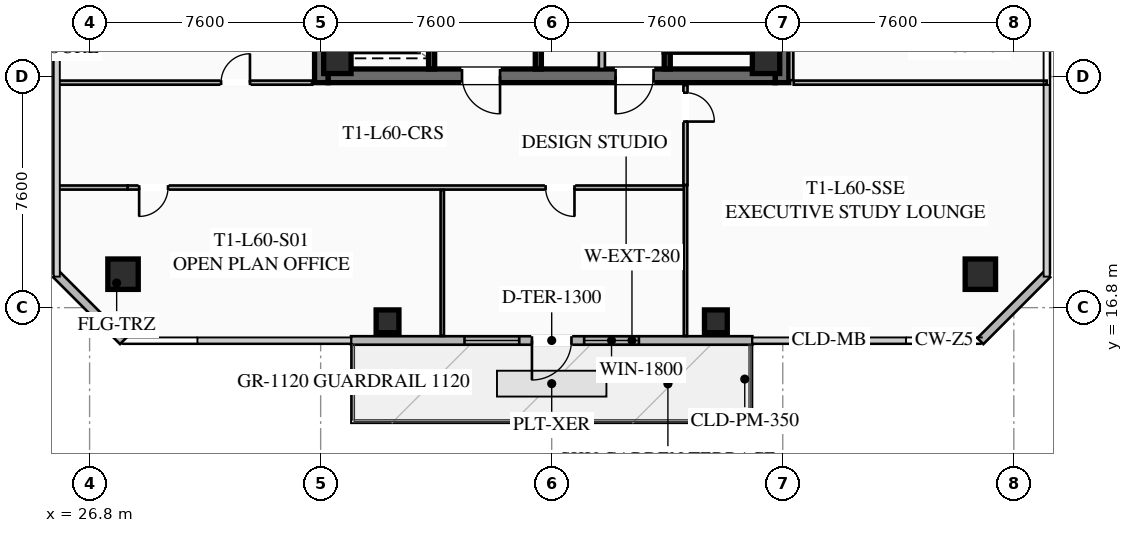
"""IFC4 building model, lengths in metres.
Left out: names, types, materials, properties, quantities, classifications, styles, units other than length and angle.
Written with IfcOpenShell. Run it as: python <this file> out.ifc"""

import sys

from ifc_helpers import new_model, si_unit, direction, frame, frame_2d, origin, origin_2d, place, context, subcontext, project, spatial, rectangle, hollow_rectangle, extrude, element, fill, save


model = new_model("IFC4")
c1 = context("Model", 3, precision=1e-05, world=origin(), true_north=direction((0.0, 1.0)))
c2 = subcontext(c1, "Body", "Model", "MODEL_VIEW")
j1 = project(units=[si_unit("LENGTHUNIT", "METRE"), si_unit("PLANEANGLEUNIT", "RADIAN")], contexts=[c1])
p1 = place(None, origin())
s1 = spatial("IfcSite", under=j1, at=p1, CompositionType="ELEMENT")
p2 = place(p1, origin())
s2 = spatial("IfcBuilding", under=s1, at=p2, CompositionType="ELEMENT")
p3 = place(p2, frame((0.0, 0.0, 221.95)))
s3 = spatial("IfcBuildingStorey", under=s2, at=p3, CompositionType="ELEMENT", Elevation=221.95)
for number, where, z_axis, x_axis in (
    (1, (34.425, 24.2, 0.0), (0.0, 0.0, 1.0), (0.0, 1.0, 0.0)),
    (2, (49.575, 39.8, 0.0), (0.0, 0.0, 1.0), (0.0, -1.0, 0.0)),
):
    element("IfcWall", number, at=place(p3, frame(where, z_axis=z_axis, x_axis=x_axis)), inside=s3, PredefinedType="SHEAR", context=c2, shape_type="SweptSolid", body=[
        extrude(rectangle(XDim=15.6, YDim=0.45, at=frame_2d((7.8, 0.0))), origin(), (0.0, 0.0, 1.0), 3.55),
    ])
p4 = place(p3, frame((49.35, 24.425, 0.0), z_axis=(0.0, 0.0, 1.0), x_axis=(-1.0, 0.0, 0.0)))
e3 = element("IfcWall", 3, at=p4, inside=s3, PredefinedType="SHEAR", context=c2, shape_type="SweptSolid", body=[
    extrude(rectangle(XDim=14.7, YDim=0.45, at=frame_2d((7.35, 0.0))), origin(), (0.0, 0.0, 1.0), 3.55),
])
p5 = place(p4, frame((9.05, 0.0, 0.0)))
e4 = element("IfcOpeningElement", 4, at=p5, cuts=e3, PredefinedType="OPENING", context=c2, shape_type="SweptSolid", body=[
    extrude(rectangle(XDim=1.25, YDim=2.25, at=frame_2d((0.625, 1.125))), frame((0.0, 0.235, 0.0), z_axis=(0.0, -1.0, 0.0), x_axis=(1.0, 0.0, 0.0)), (0.0, 0.0, 1.0), 0.47),
])
p6 = place(p4, frame((4.0, 0.0, 0.0)))
e5 = element("IfcOpeningElement", 5, at=p6, cuts=e3, PredefinedType="OPENING", context=c2, shape_type="SweptSolid", body=[
    extrude(rectangle(XDim=1.25, YDim=2.25, at=frame_2d((0.625, 1.125))), frame((0.0, 0.235, 0.0), z_axis=(0.0, -1.0, 0.0), x_axis=(1.0, 0.0, 0.0)), (0.0, 0.0, 1.0), 0.47),
])
for number, where, z_axis, x_axis in (
    (6, (34.95, 24.95, 0.0), (0.0, 0.0, 1.0), (1.0, 0.0, 0.0)),
    (7, (49.05, 24.95, 0.0), (0.0, 0.0, 1.0), (1.0, 0.0, 0.0)),
):
    element("IfcColumn", number, at=place(p3, frame(where, z_axis=z_axis, x_axis=x_axis)), inside=s3, PredefinedType="COLUMN", context=c2, shape_type="SweptSolid", body=[
        extrude(hollow_rectangle(XDim=0.9, YDim=0.9, WallThickness=0.04, at=origin_2d()), origin(), (0.0, 0.0, 1.0), 3.37),
    ])
for number, where, z_axis, x_axis in (
    (8, (27.9, 17.9, 0.0), (0.0, 0.0, 1.0), (1.0, 0.0, 0.0)),
    (9, (56.1, 17.9, 0.0), (0.0, 0.0, 1.0), (1.0, 0.0, 0.0)),
):
    element("IfcColumn", number, at=place(p3, frame(where, z_axis=z_axis, x_axis=x_axis)), inside=s3, PredefinedType="COLUMN", context=c2, shape_type="SweptSolid", body=[
        extrude(hollow_rectangle(XDim=1.0, YDim=1.0, WallThickness=0.04, at=origin_2d()), origin(), (0.0, 0.0, 1.0), 3.37),
    ])
for number, where, z_axis, x_axis in (
    (10, (36.6, 16.35, 0.0), (0.0, 0.0, 1.0), (1.0, 0.0, 0.0)),
    (11, (47.4, 16.35, 0.0), (0.0, 0.0, 1.0), (1.0, 0.0, 0.0)),
):
    element("IfcColumn", number, at=place(p3, frame(where, z_axis=z_axis, x_axis=x_axis)), inside=s3, PredefinedType="COLUMN", context=c2, shape_type="SweptSolid", body=[
        extrude(hollow_rectangle(XDim=0.75, YDim=0.75, WallThickness=0.032, at=origin_2d()), origin(), (0.0, 0.0, 1.0), 3.37),
    ])
p7 = place(p3, frame((48.6, 15.72, 0.0), z_axis=(0.0, 0.0, 1.0), x_axis=(-1.0, 0.0, 0.0)))
e12 = element("IfcWall", 12, at=p7, inside=s3, PredefinedType="SOLIDWALL", context=c2, shape_type="SweptSolid", body=[
    extrude(rectangle(XDim=13.2, YDim=0.28, at=frame_2d((6.6, 0.0))), origin(), (0.0, 0.0, 1.0), 3.37),
])
p8 = place(p7, frame((5.95, 0.0, 0.0)))
e13 = element("IfcOpeningElement", 13, at=p8, cuts=e12, PredefinedType="OPENING", context=c2, shape_type="SweptSolid", body=[
    extrude(rectangle(XDim=1.3, YDim=2.15, at=frame_2d((0.65, 1.075))), frame((0.0, 0.15, 0.0), z_axis=(0.0, -1.0, 0.0), x_axis=(1.0, 0.0, 0.0)), (0.0, 0.0, 1.0), 0.3),
])
p9 = place(p7, frame((3.732, 0.0, 0.85)))
e14 = element("IfcOpeningElement", 14, at=p9, cuts=e12, PredefinedType="OPENING", context=c2, shape_type="SweptSolid", body=[
    extrude(rectangle(XDim=1.8, YDim=1.92, at=frame_2d((0.9, 0.96))), frame((0.0, 0.15, 0.0), z_axis=(0.0, -1.0, 0.0), x_axis=(1.0, 0.0, 0.0)), (0.0, 0.0, 1.0), 0.3),
])
p10 = place(p7, frame((7.668, 0.0, 0.85)))
e15 = element("IfcOpeningElement", 15, at=p10, cuts=e12, PredefinedType="OPENING", context=c2, shape_type="SweptSolid", body=[
    extrude(rectangle(XDim=1.8, YDim=1.92, at=frame_2d((0.9, 0.96))), frame((0.0, 0.15, 0.0), z_axis=(0.0, -1.0, 0.0), x_axis=(1.0, 0.0, 0.0)), (0.0, 0.0, 1.0), 0.3),
])
for number, where, z_axis, x_axis in (
    (16, (27.9, 15.7, 0.0), (0.0, 0.0, 1.0), (-0.707, 0.707, 0.0)),
    (17, (58.3, 17.9, 0.0), (0.0, 0.0, 1.0), (-0.707, -0.707, 0.0)),
):
    element("IfcWall", number, at=place(p3, frame(where, z_axis=z_axis, x_axis=x_axis)), inside=s3, PredefinedType="SOLIDWALL", context=c2, shape_type="SweptSolid", body=[
        extrude(rectangle(XDim=3.111, YDim=0.28, at=frame_2d((1.556, 0.0))), origin(), (0.0, 0.0, 1.0), 3.37),
    ])
p11 = place(p3, frame((45.8, 32.8, 0.0), z_axis=(0.0, 0.0, 1.0), x_axis=(0.0, -1.0, 0.0)))
e18 = element("IfcWall", 18, at=p11, inside=s3, PredefinedType="SHEAR", context=c2, shape_type="SweptSolid", body=[
    extrude(rectangle(XDim=8.15, YDim=0.2, at=frame_2d((4.075, 0.0))), origin(), (0.0, 0.0, 1.0), 3.37),
])
p12 = place(p11, frame((0.45, 0.0, 0.0)))
e19 = element("IfcOpeningElement", 19, at=p12, cuts=e18, PredefinedType="OPENING", context=c2, shape_type="SweptSolid", body=[
    extrude(rectangle(XDim=1.15, YDim=2.2, at=frame_2d((0.575, 1.1))), frame((0.0, 0.11, 0.0), z_axis=(0.0, -1.0, 0.0), x_axis=(1.0, 0.0, 0.0)), (0.0, 0.0, 1.0), 0.22),
])
p13 = place(p3, frame((41.56, 24.65, 0.0), z_axis=(0.0, 0.0, 1.0), x_axis=(0.0, 1.0, 0.0)))
e20 = element("IfcWall", 20, at=p13, inside=s3, PredefinedType="SHEAR", context=c2, shape_type="SweptSolid", body=[
    extrude(rectangle(XDim=14.7, YDim=0.2, at=frame_2d((7.35, 0.0))), origin(), (0.0, 0.0, 1.0), 3.37),
])
p14 = place(p3, frame((38.05, 24.65, 0.0), z_axis=(0.0, 0.0, 1.0), x_axis=(0.0, 1.0, 0.0)))
e21 = element("IfcWall", 21, at=p14, inside=s3, PredefinedType="SHEAR", context=c2, shape_type="SweptSolid", body=[
    extrude(rectangle(XDim=6.55, YDim=0.2, at=frame_2d((3.275, 0.0))), origin(), (0.0, 0.0, 1.0), 3.37),
])
p15 = place(p14, frame((4.975, 0.0, 0.0)))
e22 = element("IfcOpeningElement", 22, at=p15, cuts=e21, PredefinedType="OPENING", context=c2, shape_type="SweptSolid", body=[
    extrude(rectangle(XDim=1.3, YDim=2.25, at=frame_2d((0.65, 1.125))), frame((0.0, 0.11, 0.0), z_axis=(0.0, -1.0, 0.0), x_axis=(1.0, 0.0, 0.0)), (0.0, 0.0, 1.0), 0.22),
])
p16 = place(p14, frame((2.975, 0.0, 0.0)))
e23 = element("IfcOpeningElement", 23, at=p16, cuts=e21, PredefinedType="OPENING", context=c2, shape_type="SweptSolid", body=[
    extrude(rectangle(XDim=1.3, YDim=2.25, at=frame_2d((0.65, 1.125))), frame((0.0, 0.11, 0.0), z_axis=(0.0, -1.0, 0.0), x_axis=(1.0, 0.0, 0.0)), (0.0, 0.0, 1.0), 0.22),
])
p17 = place(p14, frame((0.775, 0.0, 0.0)))
e24 = element("IfcOpeningElement", 24, at=p17, cuts=e21, PredefinedType="OPENING", context=c2, shape_type="SweptSolid", body=[
    extrude(rectangle(XDim=1.3, YDim=2.25, at=frame_2d((0.65, 1.125))), frame((0.0, 0.11, 0.0), z_axis=(0.0, -1.0, 0.0), x_axis=(1.0, 0.0, 0.0)), (0.0, 0.0, 1.0), 0.22),
])
p18 = place(p3, frame((43.65, 24.65, 0.0), z_axis=(0.0, 0.0, 1.0), x_axis=(0.0, 1.0, 0.0)))
e25 = element("IfcWall", 25, at=p18, inside=s3, PredefinedType="SOLIDWALL", context=c2, shape_type="SweptSolid", body=[
    extrude(rectangle(XDim=7.0, YDim=0.2, at=frame_2d((3.5, 0.0))), origin(), (0.0, 0.0, 1.0), 2.723),
])
p19 = place(p18, frame((0.85, 0.0, 0.0)))
e26 = element("IfcOpeningElement", 26, at=p19, cuts=e25, PredefinedType="OPENING", context=c2, shape_type="SweptSolid", body=[
    extrude(rectangle(XDim=0.95, YDim=2.05, at=frame_2d((0.475, 1.025))), frame((0.0, 0.11, 0.0), z_axis=(0.0, -1.0, 0.0), x_axis=(1.0, 0.0, 0.0)), (0.0, 0.0, 1.0), 0.22),
])
p20 = place(p18, frame((4.8, 0.0, 0.0)))
e27 = element("IfcOpeningElement", 27, at=p20, cuts=e25, PredefinedType="OPENING", context=c2, shape_type="SweptSolid", body=[
    extrude(rectangle(XDim=1.05, YDim=2.2, at=frame_2d((0.525, 1.1))), frame((0.0, 0.11, 0.0), z_axis=(0.0, -1.0, 0.0), x_axis=(1.0, 0.0, 0.0)), (0.0, 0.0, 1.0), 0.22),
])
p21 = place(p3, frame((46.4, 20.75, 0.0), z_axis=(0.0, 0.0, 1.0), x_axis=(-1.0, 0.0, 0.0)))
e28 = element("IfcWall", 28, at=p21, inside=s3, PredefinedType="PARTITIONING", context=c2, shape_type="SweptSolid", body=[
    extrude(rectangle(XDim=18.35, YDim=0.135, at=frame_2d((9.175, 0.0))), origin(), (0.0, 0.0, 1.0), 2.723),
])
p22 = place(p21, frame((17.02, 0.0, 0.0)))
e29 = element("IfcOpeningElement", 29, at=p22, cuts=e28, PredefinedType="OPENING", context=c2, shape_type="SweptSolid", body=[
    extrude(rectangle(XDim=0.95, YDim=2.05, at=frame_2d((0.475, 1.025))), frame((0.0, 0.077, 0.0), z_axis=(0.0, -1.0, 0.0), x_axis=(1.0, 0.0, 0.0)), (0.0, 0.0, 1.0), 0.155),
])
p23 = place(p21, frame((3.651, 0.0, 0.0)))
e30 = element("IfcOpeningElement", 30, at=p23, cuts=e28, PredefinedType="OPENING", context=c2, shape_type="SweptSolid", body=[
    extrude(rectangle(XDim=0.95, YDim=2.05, at=frame_2d((0.475, 1.025))), frame((0.0, 0.077, 0.0), z_axis=(0.0, -1.0, 0.0), x_axis=(1.0, 0.0, 0.0)), (0.0, 0.0, 1.0), 0.155),
])
p24 = place(p3, frame((25.72, 20.75, 0.0), z_axis=(0.0, 0.0, 1.0), x_axis=(1.0, 0.0, 0.0)))
e31 = element("IfcWall", 31, at=p24, inside=s3, PredefinedType="PARTITIONING", context=c2, shape_type="SweptSolid", body=[
    extrude(rectangle(XDim=2.33, YDim=0.135, at=frame_2d((1.165, 0.0))), origin(), (0.0, 0.0, 1.0), 2.723),
])
p25 = place(p3, frame((46.4, 24.12, 0.0), z_axis=(0.0, 0.0, 1.0), x_axis=(0.0, -1.0, 0.0)))
e32 = element("IfcWall", 32, at=p25, inside=s3, PredefinedType="PARTITIONING", context=c2, shape_type="SweptSolid", body=[
    extrude(rectangle(XDim=3.29, YDim=0.135, at=frame_2d((1.645, 0.0))), origin(), (0.0, 0.0, 1.0), 2.723),
])
p26 = place(p25, frame((0.25, 0.0, 0.0)))
e33 = element("IfcOpeningElement", 33, at=p26, cuts=e32, PredefinedType="OPENING", context=c2, shape_type="SweptSolid", body=[
    extrude(rectangle(XDim=0.95, YDim=2.05, at=frame_2d((0.475, 1.025))), frame((0.0, 0.077, 0.0), z_axis=(0.0, -1.0, 0.0), x_axis=(1.0, 0.0, 0.0)), (0.0, 0.0, 1.0), 0.155),
])
p27 = place(p3, frame((38.4, 15.87, 0.0), z_axis=(0.0, 0.0, 1.0), x_axis=(0.0, 1.0, 0.0)))
e34 = element("IfcWall", 34, at=p27, inside=s3, PredefinedType="PARTITIONING", context=c2, shape_type="SweptSolid", body=[
    extrude(rectangle(XDim=4.8, YDim=0.11, at=frame_2d((2.4, 0.0))), origin(), (0.0, 0.0, 1.0), 2.723),
])
p28 = place(p3, frame((46.4, 15.87, 0.0), z_axis=(0.0, 0.0, 1.0), x_axis=(0.0, 1.0, 0.0)))
e35 = element("IfcWall", 35, at=p28, inside=s3, PredefinedType="PARTITIONING", context=c2, shape_type="SweptSolid", body=[
    extrude(rectangle(XDim=4.96, YDim=0.11, at=frame_2d((2.48, 0.0))), origin(), (0.0, 0.0, 1.0), 2.723),
])
p29 = place(p3, frame((49.88, 39.72, 0.0), z_axis=(0.0, 0.0, 1.0), x_axis=(0.0, -1.0, 0.0)))
e36 = element("IfcWall", 36, at=p29, inside=s3, PredefinedType="PARTITIONING", context=c2, shape_type="SweptSolid", body=[
    extrude(rectangle(XDim=15.44, YDim=0.135, at=frame_2d((7.72, 0.0))), origin(), (0.0, 0.0, 1.0), 2.723),
])
p30 = place(p3, frame((49.96, 24.2, 0.0), z_axis=(0.0, 0.0, 1.0), x_axis=(1.0, 0.0, 0.0)))
e37 = element("IfcWall", 37, at=p30, inside=s3, PredefinedType="PARTITIONING", context=c2, shape_type="SweptSolid", body=[
    extrude(rectangle(XDim=8.32, YDim=0.135, at=frame_2d((4.16, 0.0))), origin(), (0.0, 0.0, 1.0), 2.723),
])
p31 = place(p3, frame((25.72, 24.2, 0.0), z_axis=(0.0, 0.0, 1.0), x_axis=(1.0, 0.0, 0.0)))
e38 = element("IfcWall", 38, at=p31, inside=s3, PredefinedType="PARTITIONING", context=c2, shape_type="SweptSolid", body=[
    extrude(rectangle(XDim=8.4, YDim=0.135, at=frame_2d((4.2, 0.0))), origin(), (0.0, 0.0, 1.0), 2.723),
])
p32 = place(p31, frame((5.405, 0.0, 0.0)))
e39 = element("IfcOpeningElement", 39, at=p32, cuts=e38, PredefinedType="OPENING", context=c2, shape_type="SweptSolid", body=[
    extrude(rectangle(XDim=0.95, YDim=2.05, at=frame_2d((0.475, 1.025))), frame((0.0, 0.077, 0.0), z_axis=(0.0, -1.0, 0.0), x_axis=(1.0, 0.0, 0.0)), (0.0, 0.0, 1.0), 0.155),
])
p33 = place(p8, origin())
e40 = element("IfcDoor", 40, at=p33, inside=s3, OperationType="SINGLE_SWING_RIGHT", PredefinedType="DOOR", context=c2, shape_type="SweptSolid", body=[
    extrude(rectangle(XDim=1.3, YDim=2.15, at=frame_2d((0.65, 1.075))), frame((0.0, 0.025, 0.0), z_axis=(0.0, -1.0, 0.0), x_axis=(1.0, 0.0, 0.0)), (0.0, 0.0, 1.0), 0.05),
])
fill(e13, e40)
p34 = place(p9, origin())
e41 = element("IfcWindow", 41, at=p34, inside=s3, PartitioningType="SINGLE_PANEL", PredefinedType="WINDOW", context=c2, shape_type="SweptSolid", body=[
    extrude(rectangle(XDim=1.8, YDim=1.92, at=frame_2d((0.9, 0.96))), frame((0.0, 0.03, 0.0), z_axis=(0.0, -1.0, 0.0), x_axis=(1.0, 0.0, 0.0)), (0.0, 0.0, 1.0), 0.06),
])
fill(e14, e41)
p35 = place(p10, origin())
e42 = element("IfcWindow", 42, at=p35, inside=s3, PartitioningType="SINGLE_PANEL", PredefinedType="WINDOW", context=c2, shape_type="SweptSolid", body=[
    extrude(rectangle(XDim=1.8, YDim=1.92, at=frame_2d((0.9, 0.96))), frame((0.0, 0.03, 0.0), z_axis=(0.0, -1.0, 0.0), x_axis=(1.0, 0.0, 0.0)), (0.0, 0.0, 1.0), 0.06),
])
fill(e15, e42)
p36 = place(p5, origin())
e43 = element("IfcDoor", 43, at=p36, inside=s3, OperationType="SINGLE_SWING_LEFT", PredefinedType="DOOR", context=c2, shape_type="SweptSolid", body=[
    extrude(rectangle(XDim=1.25, YDim=2.25, at=frame_2d((0.625, 1.125))), frame((0.0, 0.025, 0.0), z_axis=(0.0, -1.0, 0.0), x_axis=(1.0, 0.0, 0.0)), (0.0, 0.0, 1.0), 0.05),
])
fill(e4, e43)
p37 = place(p6, origin())
e44 = element("IfcDoor", 44, at=p37, inside=s3, OperationType="SINGLE_SWING_RIGHT", PredefinedType="DOOR", context=c2, shape_type="SweptSolid", body=[
    extrude(rectangle(XDim=1.25, YDim=2.25, at=frame_2d((0.625, 1.125))), frame((0.0, 0.025, 0.0), z_axis=(0.0, -1.0, 0.0), x_axis=(1.0, 0.0, 0.0)), (0.0, 0.0, 1.0), 0.05),
])
fill(e5, e44)
p38 = place(p22, origin())
e45 = element("IfcDoor", 45, at=p38, inside=s3, OperationType="SINGLE_SWING_RIGHT", PredefinedType="DOOR", context=c2, shape_type="SweptSolid", body=[
    extrude(rectangle(XDim=0.95, YDim=2.05, at=frame_2d((0.475, 1.025))), frame((0.0, 0.025, 0.0), z_axis=(0.0, -1.0, 0.0), x_axis=(1.0, 0.0, 0.0)), (0.0, 0.0, 1.0), 0.05),
])
fill(e29, e45)
p39 = place(p23, origin())
e46 = element("IfcDoor", 46, at=p39, inside=s3, OperationType="SINGLE_SWING_LEFT", PredefinedType="DOOR", context=c2, shape_type="SweptSolid", body=[
    extrude(rectangle(XDim=0.95, YDim=2.05, at=frame_2d((0.475, 1.025))), frame((0.0, 0.025, 0.0), z_axis=(0.0, -1.0, 0.0), x_axis=(1.0, 0.0, 0.0)), (0.0, 0.0, 1.0), 0.05),
])
fill(e30, e46)
p40 = place(p26, origin())
e47 = element("IfcDoor", 47, at=p40, inside=s3, OperationType="SINGLE_SWING_RIGHT", PredefinedType="DOOR", context=c2, shape_type="SweptSolid", body=[
    extrude(rectangle(XDim=0.95, YDim=2.05, at=frame_2d((0.475, 1.025))), frame((0.0, 0.025, 0.0), z_axis=(0.0, -1.0, 0.0), x_axis=(1.0, 0.0, 0.0)), (0.0, 0.0, 1.0), 0.05),
])
fill(e33, e47)
p41 = place(p32, origin())
e48 = element("IfcDoor", 48, at=p41, inside=s3, OperationType="SINGLE_SWING_RIGHT", PredefinedType="DOOR", context=c2, shape_type="SweptSolid", body=[
    extrude(rectangle(XDim=0.95, YDim=2.05, at=frame_2d((0.475, 1.025))), frame((0.0, 0.025, 0.0), z_axis=(0.0, -1.0, 0.0), x_axis=(1.0, 0.0, 0.0)), (0.0, 0.0, 1.0), 0.05),
])
fill(e39, e48)
save(model, sys.argv[1])
